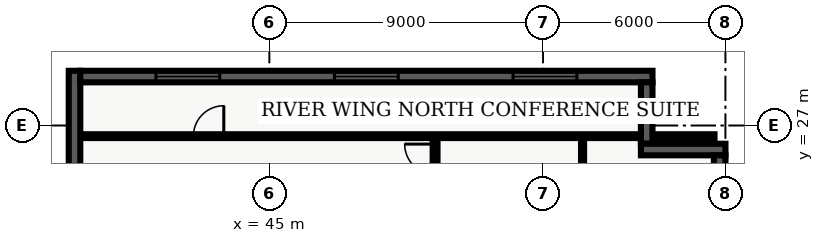
"""IFC4 building model, lengths in metres.
Left out: names, types, materials, properties, quantities, classifications, styles, units other than length and angle.
Written with IfcOpenShell. Run it as: python <this file> out.ifc"""

import sys

from ifc_helpers import new_model, entity, si_unit, converted_unit, direction, frame, origin_with_axes, origin_2d_with_axis, place, context, subcontext, project, spatial, polyline, rectangle, outline, extrude, element, fill, save


model = new_model("IFC4")
c1 = context("Model", 3, precision=1e-05, world=origin_with_axes(), true_north=direction((0.0, 1.0)))
c2 = subcontext(c1, "Body", "Model", "MODEL_VIEW")
j1 = project(units=[si_unit("LENGTHUNIT", "METRE"), converted_unit("PLANEANGLEUNIT", "DEGREE", entity("IfcPlaneAngleMeasure", 0.017), si_unit("PLANEANGLEUNIT", "RADIAN"), dimensions=[0, 0, 0, 0, 0, 0, 0])], contexts=[c1])
p1 = place(None, origin_with_axes())
s1 = spatial("IfcSite", under=j1, at=p1, CompositionType="ELEMENT")
p2 = place(p1, origin_with_axes())
s2 = spatial("IfcBuilding", under=s1, at=p2, CompositionType="ELEMENT")
p3 = place(p2, frame((0.0, 0.0, 63.9), z_axis=(0.0, 0.0, 1.0), x_axis=(1.0, 0.0, 0.0)))
s3 = spatial("IfcBuildingStorey", under=s2, at=p3, CompositionType="ELEMENT", Elevation=63.9)
p4 = place(p3, frame((50.45, 7.85, 0.0), z_axis=(0.0, 0.0, 1.0), x_axis=(0.0, 1.0, 0.0)))
e1 = element("IfcWall", 1, at=p4, inside=s3, PredefinedType="PARTITIONING", context=c2, shape_type="SweptSolid", body=[
    extrude(outline(polyline([(0.0, -0.08), (18.8, -0.08), (18.8, 0.08), (0.0, 0.08), (0.0, -0.08)])), origin_with_axes(), (0.0, 0.0, 1.0), 2.7),
])
p5 = place(p4, frame((6.549, 0.0, 0.0), z_axis=(0.0, 0.0, 1.0), x_axis=(1.0, 0.0, 0.0)))
e2 = element("IfcOpeningElement", 2, at=p5, cuts=e1, PredefinedType="OPENING", context=c2, shape_type="SweptSolid", body=[
    extrude(rectangle(XDim=1.0, YDim=0.18, at=origin_2d_with_axis()), origin_with_axes(), (0.0, 0.0, 1.0), 2.15),
])
p6 = place(p4, frame((18.039, 0.0, 0.0), z_axis=(0.0, 0.0, 1.0), x_axis=(1.0, 0.0, 0.0)))
e3 = element("IfcOpeningElement", 3, at=p6, cuts=e1, PredefinedType="OPENING", context=c2, shape_type="SweptSolid", body=[
    extrude(rectangle(XDim=1.0, YDim=0.18, at=origin_2d_with_axis()), origin_with_axes(), (0.0, 0.0, 1.0), 2.15),
])
p7 = place(p3, frame((38.76, 26.65, 0.0), z_axis=(0.0, 0.0, 1.0), x_axis=(1.0, 0.0, 0.0)))
e4 = element("IfcWall", 4, at=p7, inside=s3, PredefinedType="PARTITIONING", context=c2, shape_type="SweptSolid", body=[
    extrude(outline(polyline([(0.0, -0.062), (20.88, -0.062), (20.88, 0.062), (0.0, 0.062), (0.0, -0.062)])), origin_with_axes(), (0.0, 0.0, 1.0), 2.7),
])
p8 = place(p7, frame((4.24, 0.0, 0.0), z_axis=(0.0, 0.0, 1.0), x_axis=(1.0, 0.0, 0.0)))
e5 = element("IfcOpeningElement", 5, at=p8, cuts=e4, PredefinedType="OPENING", context=c2, shape_type="SweptSolid", body=[
    extrude(rectangle(XDim=1.0, YDim=0.145, at=origin_2d_with_axis()), origin_with_axes(), (0.0, 0.0, 1.0), 2.15),
])
p9 = place(p3, frame((55.3, 7.98, 0.0), z_axis=(0.0, 0.0, 1.0), x_axis=(0.0, 1.0, 0.0)))
e6 = element("IfcWall", 6, at=p9, inside=s3, PredefinedType="PARTITIONING", context=c2, shape_type="SweptSolid", body=[
    extrude(outline(polyline([(0.0, -0.05), (18.54, -0.05), (18.54, 0.05), (0.0, 0.05), (0.0, -0.05)])), origin_with_axes(), (0.0, 0.0, 1.0), 2.7),
])
p10 = place(p9, frame((6.419, 0.0, 0.0), z_axis=(0.0, 0.0, 1.0), x_axis=(1.0, 0.0, 0.0)))
e7 = element("IfcOpeningElement", 7, at=p10, cuts=e6, PredefinedType="OPENING", context=c2, shape_type="SweptSolid", body=[
    extrude(rectangle(XDim=0.95, YDim=0.12, at=origin_2d_with_axis()), origin_with_axes(), (0.0, 0.0, 1.0), 2.15),
])
p11 = place(p9, frame((15.759, 0.0, 0.0), z_axis=(0.0, 0.0, 1.0), x_axis=(1.0, 0.0, 0.0)))
e8 = element("IfcOpeningElement", 8, at=p11, cuts=e6, PredefinedType="OPENING", context=c2, shape_type="SweptSolid", body=[
    extrude(rectangle(XDim=0.95, YDim=0.12, at=origin_2d_with_axis()), origin_with_axes(), (0.0, 0.0, 1.0), 2.15),
])
p12 = place(p3, frame((38.59, 21.22, 0.0), z_axis=(0.0, 0.0, 1.0), x_axis=(0.0, 1.0, 0.0)))
e9 = element("IfcWall", 9, at=p12, inside=s3, PredefinedType="SOLIDWALL", context=c2, shape_type="SweptSolid", body=[
    extrude(outline(polyline([(0.0, -0.19), (7.58, -0.19), (7.58, 0.19), (0.0, 0.19), (0.0, -0.19)])), origin_with_axes(), (0.0, 0.0, 1.0), 3.66),
])
p13 = place(p3, frame((38.78, 28.61, 0.0), z_axis=(0.0, 0.0, 1.0), x_axis=(1.0, 0.0, 0.0)))
e10 = element("IfcWall", 10, at=p13, inside=s3, PredefinedType="SOLIDWALL", context=c2, shape_type="SweptSolid", body=[
    extrude(outline(polyline([(0.0, -0.19), (18.82, -0.19), (18.82, 0.19), (0.0, 0.19), (0.0, -0.19)])), origin_with_axes(), (0.0, 0.0, 1.0), 3.66),
])
p14 = place(p13, frame((3.537, 0.0, 0.45), z_axis=(0.0, 0.0, 1.0), x_axis=(1.0, 0.0, 0.0)))
e11 = element("IfcOpeningElement", 11, at=p14, cuts=e10, PredefinedType="OPENING", context=c2, shape_type="SweptSolid", body=[
    extrude(rectangle(XDim=2.1, YDim=0.4, at=origin_2d_with_axis()), origin_with_axes(), (0.0, 0.0, 1.0), 2.2),
])
p15 = place(p13, frame((9.41, 0.0, 0.45), z_axis=(0.0, 0.0, 1.0), x_axis=(1.0, 0.0, 0.0)))
e12 = element("IfcOpeningElement", 12, at=p15, cuts=e10, PredefinedType="OPENING", context=c2, shape_type="SweptSolid", body=[
    extrude(rectangle(XDim=2.1, YDim=0.4, at=origin_2d_with_axis()), origin_with_axes(), (0.0, 0.0, 1.0), 2.2),
])
p16 = place(p13, frame((15.283, 0.0, 0.45), z_axis=(0.0, 0.0, 1.0), x_axis=(1.0, 0.0, 0.0)))
e13 = element("IfcOpeningElement", 13, at=p16, cuts=e10, PredefinedType="OPENING", context=c2, shape_type="SweptSolid", body=[
    extrude(rectangle(XDim=2.1, YDim=0.4, at=origin_2d_with_axis()), origin_with_axes(), (0.0, 0.0, 1.0), 2.2),
])
p17 = place(p3, frame((57.41, 28.42, 0.0), z_axis=(0.0, 0.0, 1.0), x_axis=(0.0, -1.0, 0.0)))
e14 = element("IfcWall", 14, at=p17, inside=s3, PredefinedType="SOLIDWALL", context=c2, shape_type="SweptSolid", body=[
    extrude(outline(polyline([(0.0, -0.19), (2.02, -0.19), (2.02, 0.19), (0.0, 0.19), (0.0, -0.19)])), origin_with_axes(), (0.0, 0.0, 1.0), 3.66),
])
p18 = place(p3, frame((57.22, 26.21, 0.0), z_axis=(0.0, 0.0, 1.0), x_axis=(1.0, 0.0, 0.0)))
e15 = element("IfcWall", 15, at=p18, inside=s3, PredefinedType="SOLIDWALL", context=c2, shape_type="SweptSolid", body=[
    extrude(outline(polyline([(0.0, -0.19), (2.78, -0.19), (2.78, 0.19), (0.0, 0.19), (0.0, -0.19)])), origin_with_axes(), (0.0, 0.0, 1.0), 3.66),
])
p19 = place(p3, frame((59.81, 26.02, 0.0), z_axis=(0.0, 0.0, 1.0), x_axis=(0.0, -1.0, 0.0)))
e16 = element("IfcWall", 16, at=p19, inside=s3, PredefinedType="SOLIDWALL", context=c2, shape_type="SweptSolid", body=[
    extrude(outline(polyline([(0.0, -0.19), (23.62, -0.19), (23.62, 0.19), (0.0, 0.19), (0.0, -0.19)])), origin_with_axes(), (0.0, 0.0, 1.0), 3.66),
])
p20 = place(p19, frame((20.218, 0.0, 0.45), z_axis=(0.0, 0.0, 1.0), x_axis=(1.0, 0.0, 0.0)))
e17 = element("IfcOpeningElement", 17, at=p20, cuts=e16, PredefinedType="OPENING", context=c2, shape_type="SweptSolid", body=[
    extrude(rectangle(XDim=2.1, YDim=0.4, at=origin_2d_with_axis()), origin_with_axes(), (0.0, 0.0, 1.0), 2.2),
])
p21 = place(p7, frame((4.24, 0.0, 0.0), z_axis=(0.0, 0.0, 1.0), x_axis=(1.0, 0.0, 0.0)))
e18 = element("IfcDoor", 18, at=p21, inside=s3, OperationType="SINGLE_SWING_RIGHT", PredefinedType="DOOR", context=c2, shape_type="SweptSolid", body=[
    extrude(rectangle(XDim=1.0, YDim=0.075, at=origin_2d_with_axis()), origin_with_axes(), (0.0, 0.0, 1.0), 2.15),
])
fill(e5, e18)
p22 = place(p4, frame((18.039, 0.0, 0.0), z_axis=(0.0, 0.0, 1.0), x_axis=(1.0, 0.0, 0.0)))
e19 = element("IfcDoor", 19, at=p22, inside=s3, OperationType="SINGLE_SWING_RIGHT", PredefinedType="DOOR", context=c2, shape_type="SweptSolid", body=[
    extrude(rectangle(XDim=1.0, YDim=0.09, at=origin_2d_with_axis()), origin_with_axes(), (0.0, 0.0, 1.0), 2.15),
])
fill(e3, e19)
p23 = place(p13, frame((3.537, 0.0, 0.45), z_axis=(0.0, 0.0, 1.0), x_axis=(1.0, 0.0, 0.0)))
e20 = element("IfcWindow", 20, at=p23, inside=s3, PredefinedType="WINDOW", context=c2, shape_type="SweptSolid", body=[
    extrude(rectangle(XDim=2.1, YDim=0.09, at=origin_2d_with_axis()), origin_with_axes(), (0.0, 0.0, 1.0), 2.2),
])
fill(e11, e20)
p24 = place(p13, frame((9.41, 0.0, 0.45), z_axis=(0.0, 0.0, 1.0), x_axis=(1.0, 0.0, 0.0)))
e21 = element("IfcWindow", 21, at=p24, inside=s3, PredefinedType="WINDOW", context=c2, shape_type="SweptSolid", body=[
    extrude(rectangle(XDim=2.1, YDim=0.09, at=origin_2d_with_axis()), origin_with_axes(), (0.0, 0.0, 1.0), 2.2),
])
fill(e12, e21)
p25 = place(p13, frame((15.283, 0.0, 0.45), z_axis=(0.0, 0.0, 1.0), x_axis=(1.0, 0.0, 0.0)))
e22 = element("IfcWindow", 22, at=p25, inside=s3, PredefinedType="WINDOW", context=c2, shape_type="SweptSolid", body=[
    extrude(rectangle(XDim=2.1, YDim=0.09, at=origin_2d_with_axis()), origin_with_axes(), (0.0, 0.0, 1.0), 2.2),
])
fill(e13, e22)
save(model, sys.argv[1])
